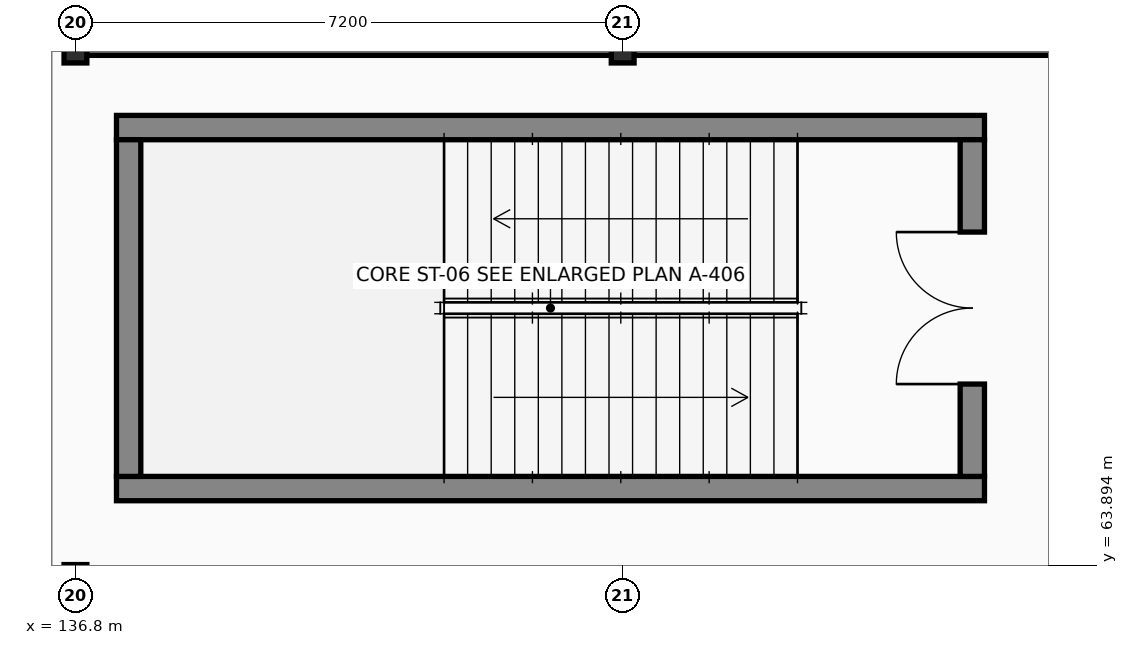
"""IFC4 building model, lengths in metres.
Left out: names, types, materials, properties, quantities, classifications, styles, units other than length and angle.
Written with IfcOpenShell. Run it as: python <this file> out.ifc"""

import sys

from ifc_helpers import new_model, si_unit, direction, frame, frame_2d, origin, origin_2d, place, context, subcontext, project, spatial, rectangle, i_section, extrude, element, fill, save


model = new_model("IFC4")
c1 = context("Model", 3, precision=1e-05, world=origin(), true_north=direction((0.0, 1.0)))
c2 = subcontext(c1, "Body", "Model", "MODEL_VIEW")
j1 = project(units=[si_unit("LENGTHUNIT", "METRE"), si_unit("PLANEANGLEUNIT", "RADIAN")], contexts=[c1])
p1 = place(None, origin())
s1 = spatial("IfcSite", under=j1, at=p1, CompositionType="ELEMENT")
p2 = place(p1, origin())
s2 = spatial("IfcBuilding", under=s1, at=p2, CompositionType="ELEMENT")
p3 = place(p2, frame((0.0, 0.0, -4.8)))
s3 = spatial("IfcBuildingStorey", under=s2, at=p3, CompositionType="ELEMENT", Elevation=-4.8)
for number, where, z_axis, x_axis in (
    (1, (136.8, 63.6, 0.0), (0.0, 0.0, 1.0), (1.0, 0.0, 0.0)),
    (2, (136.8, 70.8, 0.0), (0.0, 0.0, 1.0), (1.0, 0.0, 0.0)),
    (3, (144.0, 70.8, 0.0), (0.0, 0.0, 1.0), (1.0, 0.0, 0.0)),
):
    element("IfcColumn", number, at=place(p3, frame(where, z_axis=z_axis, x_axis=x_axis)), inside=s3, PredefinedType="COLUMN", context=c2, shape_type="SweptSolid", body=[
        extrude(i_section(OverallWidth=0.3, OverallDepth=0.6, WebThickness=0.015, FlangeThickness=0.03, at=origin_2d()), origin(), (0.0, 0.0, 1.0), 4.8),
    ])
p4 = place(p3, frame((161.4, 70.8, 0.0), z_axis=(0.0, 0.0, 1.0), x_axis=(-1.0, 0.0, 0.0)))
e4 = element("IfcWall", 4, at=p4, inside=s3, PredefinedType="USERDEFINED", context=c2, shape_type="SweptSolid", body=[
    extrude(rectangle(XDim=24.6, YDim=0.4, at=frame_2d((12.3, 0.0))), origin(), (0.0, 0.0, 1.0), 4.55),
])
for number, where, z_axis, x_axis in (
    (5, (137.34, 64.9, 0.0), (0.0, 0.0, 1.0), (1.0, 0.0, 0.0)),
    (6, (137.34, 69.65, 0.0), (0.0, 0.0, 1.0), (1.0, 0.0, 0.0)),
):
    element("IfcWall", number, at=place(p3, frame(where, z_axis=z_axis, x_axis=x_axis)), inside=s3, PredefinedType="SHEAR", context=c2, shape_type="SweptSolid", body=[
        extrude(rectangle(XDim=11.42, YDim=0.32, at=frame_2d((5.71, 0.0))), origin(), (0.0, 0.0, 1.0), 4.55),
    ])
p5 = place(p3, frame((137.5, 65.06, 0.0), z_axis=(0.0, 0.0, 1.0), x_axis=(0.0, 1.0, 0.0)))
e7 = element("IfcWall", 7, at=p5, inside=s3, PredefinedType="SHEAR", context=c2, shape_type="SweptSolid", body=[
    extrude(rectangle(XDim=4.43, YDim=0.32, at=frame_2d((2.215, 0.0))), origin(), (0.0, 0.0, 1.0), 4.55),
])
p6 = place(p3, frame((148.6, 65.06, 0.0), z_axis=(0.0, 0.0, 1.0), x_axis=(0.0, 1.0, 0.0)))
e8 = element("IfcWall", 8, at=p6, inside=s3, PredefinedType="SHEAR", context=c2, shape_type="SweptSolid", body=[
    extrude(rectangle(XDim=4.43, YDim=0.32, at=frame_2d((2.215, 0.0))), origin(), (0.0, 0.0, 1.0), 4.55),
])
p7 = place(p6, frame((1.215, 0.0, 0.0)))
e9 = element("IfcOpeningElement", 9, at=p7, cuts=e8, PredefinedType="OPENING", context=c2, shape_type="SweptSolid", body=[
    extrude(rectangle(XDim=2.0, YDim=2.15, at=frame_2d((1.0, 1.075))), frame((0.0, 0.17, 0.0), z_axis=(0.0, -1.0, 0.0), x_axis=(1.0, 0.0, 0.0)), (0.0, 0.0, 1.0), 0.34),
])
p8 = place(p7, origin())
e10 = element("IfcDoor", 10, at=p8, inside=s3, OperationType="DOUBLE_DOOR_SINGLE_SWING", PredefinedType="DOOR", context=c2, shape_type="SweptSolid", body=[
    extrude(rectangle(XDim=2.0, YDim=2.15, at=frame_2d((1.0, 1.075))), frame((0.0, 0.025, 0.0), z_axis=(0.0, -1.0, 0.0), x_axis=(1.0, 0.0, 0.0)), (0.0, 0.0, 1.0), 0.05),
])
fill(e9, e10)
save(model, sys.argv[1])
